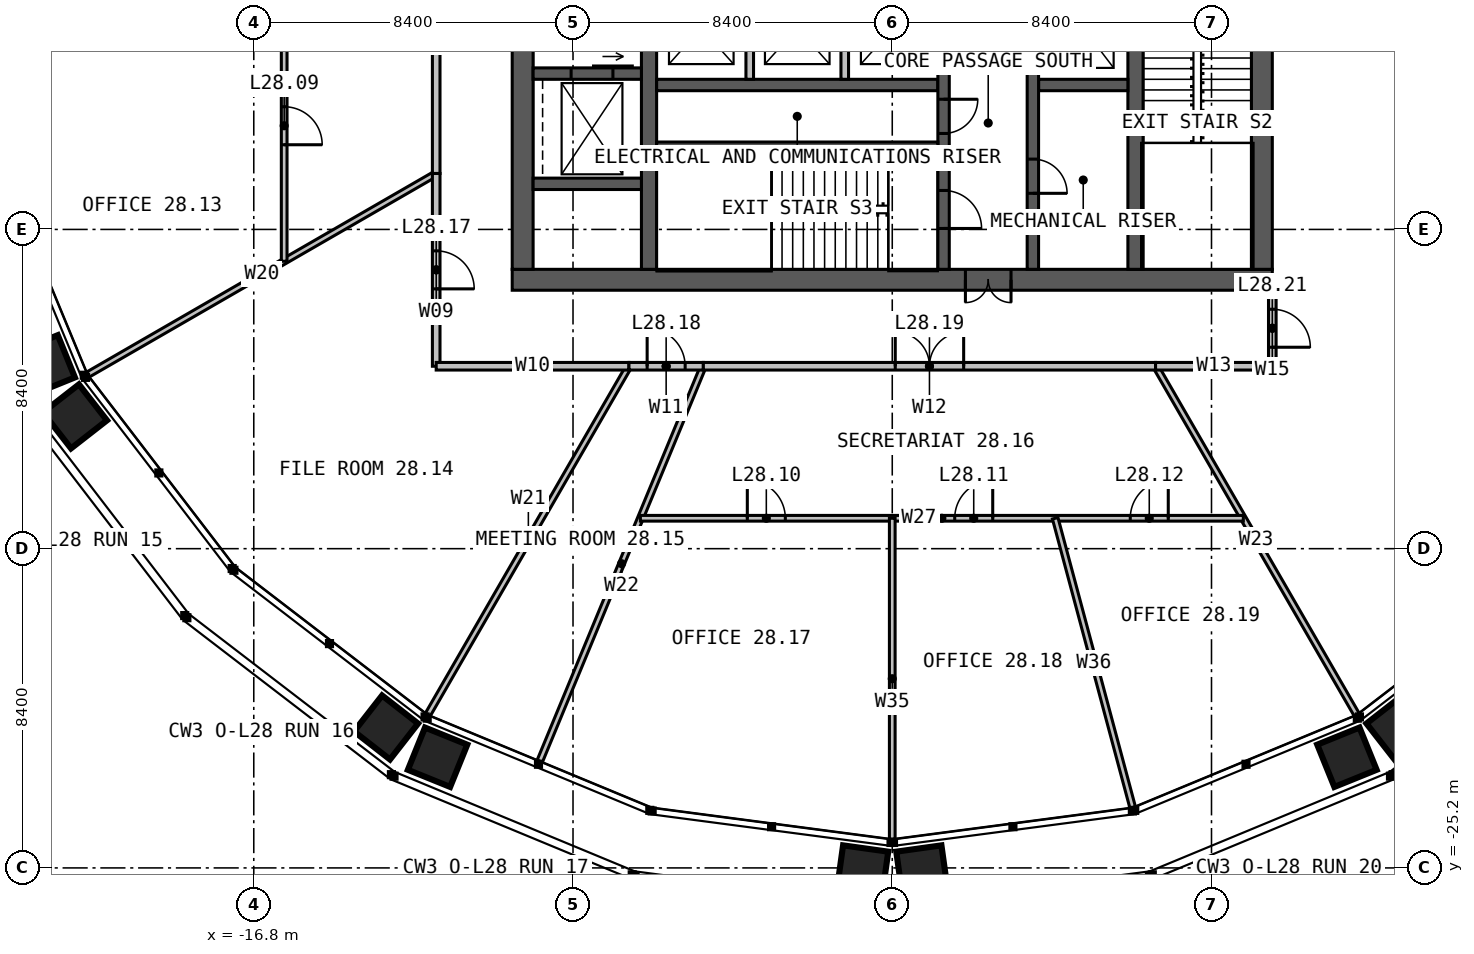
"""IFC4 building model, lengths in metres.
Left out: names, types, materials, properties, quantities, classifications, styles, units other than length and angle.
Written with IfcOpenShell. Run it as: python <this file> out.ifc"""

import sys

from ifc_helpers import new_model, si_unit, direction, frame, frame_2d, origin, place, context, subcontext, project, spatial, rectangle, extrude, element, fill, save


model = new_model("IFC4")
c1 = context("Model", 3, precision=1e-05, world=origin(), true_north=direction((0.0, 1.0)))
c2 = subcontext(c1, "Body", "Model", "MODEL_VIEW")
j1 = project(units=[si_unit("LENGTHUNIT", "METRE"), si_unit("PLANEANGLEUNIT", "RADIAN")], contexts=[c1])
p1 = place(None, origin())
s1 = spatial("IfcSite", under=j1, at=p1, CompositionType="ELEMENT")
p2 = place(p1, origin())
s2 = spatial("IfcBuilding", under=s1, at=p2, CompositionType="ELEMENT")
p3 = place(p2, frame((0.0, 0.0, 118.0)))
s3 = spatial("IfcBuildingStorey", under=s2, at=p3, CompositionType="ELEMENT", Elevation=118.0)
p4 = place(p3, frame((10.0, -9.725, 0.0), z_axis=(0.0, 0.0, 1.0), x_axis=(-1.0, 0.0, 0.0)))
e1 = element("IfcWall", 1, at=p4, inside=s3, PredefinedType="SOLIDWALL", context=c2, shape_type="SweptSolid", body=[
    extrude(rectangle(XDim=20.0, YDim=0.55, at=frame_2d((10.0, 0.0))), origin(), (0.0, 0.0, 1.0), 4.0),
])
p5 = place(p4, frame((6.875, 0.0, 0.0)))
e2 = element("IfcOpeningElement", 2, at=p5, cuts=e1, PredefinedType="OPENING", context=c2, shape_type="SweptSolid", body=[
    extrude(rectangle(XDim=1.2, YDim=2.2, at=frame_2d((0.6, 1.1))), frame((0.0, 0.285, 0.0), z_axis=(0.0, -1.0, 0.0), x_axis=(1.0, 0.0, 0.0)), (0.0, 0.0, 1.0), 0.57),
])
for number, where, z_axis, x_axis in (
    (3, (9.725, -9.45, 0.0), (0.0, 0.0, 1.0), (0.0, 1.0, 0.0)),
    (4, (-9.725, 9.45, 0.0), (0.0, 0.0, 1.0), (0.0, -1.0, 0.0)),
):
    element("IfcWall", number, at=place(p3, frame(where, z_axis=z_axis, x_axis=x_axis)), inside=s3, PredefinedType="SOLIDWALL", context=c2, shape_type="SweptSolid", body=[
        extrude(rectangle(XDim=18.9, YDim=0.55, at=frame_2d((9.45, 0.0))), origin(), (0.0, 0.0, 1.0), 4.0),
    ])
p6 = place(p3, frame((-6.4, -9.45, 0.0), z_axis=(0.0, 0.0, 1.0), x_axis=(0.0, 1.0, 0.0)))
e5 = element("IfcWall", 5, at=p6, inside=s3, PredefinedType="SOLIDWALL", context=c2, shape_type="SweptSolid", body=[
    extrude(rectangle(XDim=18.9, YDim=0.4, at=frame_2d((9.45, 0.0))), origin(), (0.0, 0.0, 1.0), 4.0),
])
p7 = place(p6, frame((8.95, 0.0, 0.0)))
e6 = element("IfcOpeningElement", 6, at=p7, cuts=e5, PredefinedType="OPENING", context=c2, shape_type="SweptSolid", body=[
    extrude(rectangle(XDim=1.0, YDim=2.2, at=frame_2d((0.5, 1.1))), frame((0.0, 0.21, 0.0), z_axis=(0.0, -1.0, 0.0), x_axis=(1.0, 0.0, 0.0)), (0.0, 0.0, 1.0), 0.42),
])
p8 = place(p3, frame((6.4, 9.45, 0.0), z_axis=(0.0, 0.0, 1.0), x_axis=(0.0, -1.0, 0.0)))
e7 = element("IfcWall", 7, at=p8, inside=s3, PredefinedType="SOLIDWALL", context=c2, shape_type="SweptSolid", body=[
    extrude(rectangle(XDim=18.9, YDim=0.4, at=frame_2d((9.45, 0.0))), origin(), (0.0, 0.0, 1.0), 4.0),
])
p9 = place(p8, frame((8.95, 0.0, 0.0)))
e8 = element("IfcOpeningElement", 8, at=p9, cuts=e7, PredefinedType="OPENING", context=c2, shape_type="SweptSolid", body=[
    extrude(rectangle(XDim=1.0, YDim=2.2, at=frame_2d((0.5, 1.1))), frame((0.0, 0.21, 0.0), z_axis=(0.0, -1.0, 0.0), x_axis=(1.0, 0.0, 0.0)), (0.0, 0.0, 1.0), 0.42),
])
p10 = place(p3, frame((-6.2, -4.6, 0.0), z_axis=(0.0, 0.0, 1.0), x_axis=(1.0, 0.0, 0.0)))
e9 = element("IfcWall", 9, at=p10, inside=s3, PredefinedType="SOLIDWALL", context=c2, shape_type="SweptSolid", body=[
    extrude(rectangle(XDim=7.4, YDim=0.3, at=frame_2d((3.7, 0.0))), origin(), (0.0, 0.0, 1.0), 4.0),
])
p11 = place(p3, frame((3.85, -4.6, 0.0), z_axis=(0.0, 0.0, 1.0), x_axis=(1.0, 0.0, 0.0)))
e10 = element("IfcWall", 10, at=p11, inside=s3, PredefinedType="SOLIDWALL", context=c2, shape_type="SweptSolid", body=[
    extrude(rectangle(XDim=2.35, YDim=0.3, at=frame_2d((1.175, 0.0))), origin(), (0.0, 0.0, 1.0), 4.0),
])
p12 = place(p3, frame((1.35, -1.45, 0.0), z_axis=(0.0, 0.0, 1.0), x_axis=(0.0, -1.0, 0.0)))
e11 = element("IfcWall", 11, at=p12, inside=s3, PredefinedType="SOLIDWALL", context=c2, shape_type="SweptSolid", body=[
    extrude(rectangle(XDim=8.0, YDim=0.3, at=frame_2d((4.0, 0.0))), origin(), (0.0, 0.0, 1.0), 4.0),
])
p13 = place(p12, frame((5.925, 0.0, 0.0)))
e12 = element("IfcOpeningElement", 12, at=p13, cuts=e11, PredefinedType="OPENING", context=c2, shape_type="SweptSolid", body=[
    extrude(rectangle(XDim=1.0, YDim=2.2, at=frame_2d((0.5, 1.1))), frame((0.0, 0.16, 0.0), z_axis=(0.0, -1.0, 0.0), x_axis=(1.0, 0.0, 0.0)), (0.0, 0.0, 1.0), 0.32),
])
p14 = place(p12, frame((3.525, 0.0, 0.0)))
e13 = element("IfcOpeningElement", 13, at=p14, cuts=e11, PredefinedType="OPENING", context=c2, shape_type="SweptSolid", body=[
    extrude(rectangle(XDim=0.9, YDim=2.2, at=frame_2d((0.45, 1.1))), frame((0.0, 0.16, 0.0), z_axis=(0.0, -1.0, 0.0), x_axis=(1.0, 0.0, 0.0)), (0.0, 0.0, 1.0), 0.32),
])
p15 = place(p3, frame((3.7, -1.45, 0.0), z_axis=(0.0, 0.0, 1.0), x_axis=(0.0, -1.0, 0.0)))
e14 = element("IfcWall", 14, at=p15, inside=s3, PredefinedType="SOLIDWALL", context=c2, shape_type="SweptSolid", body=[
    extrude(rectangle(XDim=8.0, YDim=0.3, at=frame_2d((4.0, 0.0))), origin(), (0.0, 0.0, 1.0), 4.0),
])
p16 = place(p15, frame((5.1, 0.0, 0.0)))
e15 = element("IfcOpeningElement", 15, at=p16, cuts=e14, PredefinedType="OPENING", context=c2, shape_type="SweptSolid", body=[
    extrude(rectangle(XDim=0.9, YDim=2.2, at=frame_2d((0.45, 1.1))), frame((0.0, 0.16, 0.0), z_axis=(0.0, -1.0, 0.0), x_axis=(1.0, 0.0, 0.0)), (0.0, 0.0, 1.0), 0.32),
])
p17 = place(p3, frame((-6.2, -6.2, 0.0), z_axis=(0.0, 0.0, 1.0), x_axis=(1.0, 0.0, 0.0)))
e16 = element("IfcWall", 16, at=p17, inside=s3, PredefinedType="SOLIDWALL", context=c2, shape_type="SweptSolid", body=[
    extrude(rectangle(XDim=7.4, YDim=0.2, at=frame_2d((3.7, 0.0))), origin(), (0.0, 0.0, 1.0), 4.0),
])
p18 = place(p3, frame((-9.45, -4.3, 0.0), z_axis=(0.0, 0.0, 1.0), x_axis=(1.0, 0.0, 0.0)))
e17 = element("IfcWall", 17, at=p18, inside=s3, PredefinedType="SOLIDWALL", context=c2, shape_type="SweptSolid", body=[
    extrude(rectangle(XDim=2.85, YDim=0.3, at=frame_2d((1.425, 0.0))), origin(), (0.0, 0.0, 1.0), 4.0),
])
p19 = place(p18, frame((1.0, 0.0, 0.0)))
e18 = element("IfcOpeningElement", 18, at=p19, cuts=e17, PredefinedType="OPENING", context=c2, shape_type="SweptSolid", body=[
    extrude(rectangle(XDim=1.1, YDim=2.2, at=frame_2d((0.55, 1.1))), frame((0.0, 0.16, 0.0), z_axis=(0.0, -1.0, 0.0), x_axis=(1.0, 0.0, 0.0)), (0.0, 0.0, 1.0), 0.32),
])
p20 = place(p3, frame((-9.45, -7.2, 0.0), z_axis=(0.0, 0.0, 1.0), x_axis=(1.0, 0.0, 0.0)))
e19 = element("IfcWall", 19, at=p20, inside=s3, PredefinedType="SOLIDWALL", context=c2, shape_type="SweptSolid", body=[
    extrude(rectangle(XDim=2.85, YDim=0.3, at=frame_2d((1.425, 0.0))), origin(), (0.0, 0.0, 1.0), 4.0),
])
for number, where, z_axis, x_axis in (
    (20, (-3.75, -1.75, 0.0), (0.0, 0.0, 1.0), (0.0, -1.0, 0.0)),
    (21, (-1.25, -1.75, 0.0), (0.0, 0.0, 1.0), (0.0, -1.0, 0.0)),
):
    element("IfcWall", number, at=place(p3, frame(where, z_axis=z_axis, x_axis=x_axis)), inside=s3, PredefinedType="SOLIDWALL", context=c2, shape_type="SweptSolid", body=[
        extrude(rectangle(XDim=2.7, YDim=0.2, at=frame_2d((1.35, 0.0))), origin(), (0.0, 0.0, 1.0), 3.75),
    ])
for number, where, z_axis, x_axis in (
    (22, (-12.0, -6.928, 0.0), (0.0, 0.0, 1.0), (-0.866, -0.5, 0.0)),
    (23, (-6.928, -12.0, 0.0), (0.0, 0.0, 1.0), (-0.5, -0.866, 0.0)),
):
    element("IfcWall", number, at=place(p3, frame(where, z_axis=z_axis, x_axis=x_axis)), inside=s3, PredefinedType="PARTITIONING", context=c2, shape_type="SweptSolid", body=[
        extrude(rectangle(XDim=10.587, YDim=0.15, at=frame_2d((5.293, 0.0))), origin(), (0.0, 0.0, 1.0), 2.79),
    ])
p21 = place(p3, frame((-4.97, -12.0, 0.0), z_axis=(0.0, 0.0, 1.0), x_axis=(-0.382686061022, -0.923878443682, 0.0)))
e24 = element("IfcWall", 24, at=p21, inside=s3, PredefinedType="PARTITIONING", context=c2, shape_type="SweptSolid", body=[
    extrude(rectangle(XDim=11.245, YDim=0.15, at=frame_2d((5.623, 0.0))), origin(), (0.0, 0.0, 1.0), 2.79),
])
p22 = place(p3, frame((6.928, -12.0, 0.0), z_axis=(0.0, 0.0, 1.0), x_axis=(0.500003251404, -0.866023526577, 0.0)))
e25 = element("IfcWall", 25, at=p22, inside=s3, PredefinedType="PARTITIONING", context=c2, shape_type="SweptSolid", body=[
    extrude(rectangle(XDim=10.587, YDim=0.15, at=frame_2d((5.293, 0.0))), origin(), (0.0, 0.0, 1.0), 2.79),
])
p23 = place(p3, frame((-16.0, 4.287, 0.0), z_axis=(0.0, 0.0, 1.0), x_axis=(0.0, -1.0, 0.0)))
e26 = element("IfcWall", 26, at=p23, inside=s3, PredefinedType="PARTITIONING", context=c2, shape_type="SweptSolid", body=[
    extrude(rectangle(XDim=13.525, YDim=0.15, at=frame_2d((6.762, 0.0))), origin(), (0.0, 0.0, 1.0), 2.79),
])
p24 = place(p23, frame((2.697, 0.0, 0.0)))
e27 = element("IfcOpeningElement", 27, at=p24, cuts=e26, PredefinedType="OPENING", context=c2, shape_type="SweptSolid", body=[
    extrude(rectangle(XDim=1.0, YDim=2.2, at=frame_2d((0.5, 1.1))), frame((0.0, 0.085, 0.0), z_axis=(0.0, -1.0, 0.0), x_axis=(1.0, 0.0, 0.0)), (0.0, 0.0, 1.0), 0.17),
])
p25 = place(p23, frame((9.459, 0.0, 0.0)))
e28 = element("IfcOpeningElement", 28, at=p25, cuts=e26, PredefinedType="OPENING", context=c2, shape_type="SweptSolid", body=[
    extrude(rectangle(XDim=1.0, YDim=2.2, at=frame_2d((0.5, 1.1))), frame((0.0, 0.085, 0.0), z_axis=(0.0, -1.0, 0.0), x_axis=(1.0, 0.0, 0.0)), (0.0, 0.0, 1.0), 0.17),
])
p26 = place(p3, frame((-12.0, 3.215, 0.0), z_axis=(0.0, 0.0, 1.0), x_axis=(0.0, -1.0, 0.0)))
e29 = element("IfcWall", 29, at=p26, inside=s3, PredefinedType="PARTITIONING", context=c2, shape_type="SweptSolid", body=[
    extrude(rectangle(XDim=10.144, YDim=0.2, at=frame_2d((5.072, 0.0))), origin(), (0.0, 0.0, 1.0), 3.8),
])
p27 = place(p26, frame((4.172, 0.0, 0.0)))
e30 = element("IfcOpeningElement", 30, at=p27, cuts=e29, PredefinedType="OPENING", context=c2, shape_type="SweptSolid", body=[
    extrude(rectangle(XDim=1.8, YDim=2.2, at=frame_2d((0.9, 1.1))), frame((0.0, 0.11, 0.0), z_axis=(0.0, -1.0, 0.0), x_axis=(1.0, 0.0, 0.0)), (0.0, 0.0, 1.0), 0.22),
])
p28 = place(p3, frame((-12.0, -6.928, 0.0), z_axis=(0.0, 0.0, 1.0), x_axis=(0.0, -1.0, 0.0)))
e31 = element("IfcWall", 31, at=p28, inside=s3, PredefinedType="PARTITIONING", context=c2, shape_type="SweptSolid", body=[
    extrude(rectangle(XDim=5.072, YDim=0.2, at=frame_2d((2.536, 0.0))), origin(), (0.0, 0.0, 1.0), 3.8),
])
p29 = place(p28, frame((2.036, 0.0, 0.0)))
e32 = element("IfcOpeningElement", 32, at=p29, cuts=e31, PredefinedType="OPENING", context=c2, shape_type="SweptSolid", body=[
    extrude(rectangle(XDim=1.0, YDim=2.2, at=frame_2d((0.5, 1.1))), frame((0.0, 0.11, 0.0), z_axis=(0.0, -1.0, 0.0), x_axis=(1.0, 0.0, 0.0)), (0.0, 0.0, 1.0), 0.22),
])
p30 = place(p3, frame((-12.0, -12.0, 0.0), z_axis=(0.0, 0.0, 1.0), x_axis=(1.0, 0.0, 0.0)))
e33 = element("IfcWall", 33, at=p30, inside=s3, PredefinedType="PARTITIONING", context=c2, shape_type="SweptSolid", body=[
    extrude(rectangle(XDim=5.072, YDim=0.2, at=frame_2d((2.536, 0.0))), origin(), (0.0, 0.0, 1.0), 3.8),
])
p31 = place(p3, frame((-6.928, -12.0, 0.0), z_axis=(0.0, 0.0, 1.0), x_axis=(1.0, 0.0, 0.0)))
e34 = element("IfcWall", 34, at=p31, inside=s3, PredefinedType="PARTITIONING", context=c2, shape_type="SweptSolid", body=[
    extrude(rectangle(XDim=1.958, YDim=0.2, at=frame_2d((0.979, 0.0))), origin(), (0.0, 0.0, 1.0), 3.8),
])
p32 = place(p31, frame((0.479, 0.0, 0.0)))
e35 = element("IfcOpeningElement", 35, at=p32, cuts=e34, PredefinedType="OPENING", context=c2, shape_type="SweptSolid", body=[
    extrude(rectangle(XDim=1.0, YDim=2.2, at=frame_2d((0.5, 1.1))), frame((0.0, 0.11, 0.0), z_axis=(0.0, -1.0, 0.0), x_axis=(1.0, 0.0, 0.0)), (0.0, 0.0, 1.0), 0.22),
])
p33 = place(p3, frame((-6.627, -16.0, 0.0), z_axis=(0.0, 0.0, 1.0), x_axis=(1.0, 0.0, 0.0)))
e36 = element("IfcWall", 36, at=p33, inside=s3, PredefinedType="PARTITIONING", context=c2, shape_type="SweptSolid", body=[
    extrude(rectangle(XDim=15.865, YDim=0.15, at=frame_2d((7.933, 0.0))), origin(), (0.0, 0.0, 1.0), 2.79),
])
p34 = place(p33, frame((2.814, 0.0, 0.0)))
e37 = element("IfcOpeningElement", 37, at=p34, cuts=e36, PredefinedType="OPENING", context=c2, shape_type="SweptSolid", body=[
    extrude(rectangle(XDim=1.0, YDim=2.2, at=frame_2d((0.5, 1.1))), frame((0.0, 0.085, 0.0), z_axis=(0.0, -1.0, 0.0), x_axis=(1.0, 0.0, 0.0)), (0.0, 0.0, 1.0), 0.17),
])
p35 = place(p33, frame((8.271, 0.0, 0.0)))
e38 = element("IfcOpeningElement", 38, at=p35, cuts=e36, PredefinedType="OPENING", context=c2, shape_type="SweptSolid", body=[
    extrude(rectangle(XDim=1.0, YDim=2.2, at=frame_2d((0.5, 1.1))), frame((0.0, 0.085, 0.0), z_axis=(0.0, -1.0, 0.0), x_axis=(1.0, 0.0, 0.0)), (0.0, 0.0, 1.0), 0.17),
])
p36 = place(p33, frame((12.89, 0.0, 0.0)))
e39 = element("IfcOpeningElement", 39, at=p36, cuts=e36, PredefinedType="OPENING", context=c2, shape_type="SweptSolid", body=[
    extrude(rectangle(XDim=1.0, YDim=2.2, at=frame_2d((0.5, 1.1))), frame((0.0, 0.085, 0.0), z_axis=(0.0, -1.0, 0.0), x_axis=(1.0, 0.0, 0.0)), (0.0, 0.0, 1.0), 0.17),
])
p37 = place(p3, frame((0.0, -16.0, 0.0), z_axis=(0.0, 0.0, 1.0), x_axis=(0.0, -1.0, 0.0)))
e40 = element("IfcWall", 40, at=p37, inside=s3, PredefinedType="PARTITIONING", context=c2, shape_type="SweptSolid", body=[
    extrude(rectangle(XDim=8.443, YDim=0.15, at=frame_2d((4.222, 0.0))), origin(), (0.0, 0.0, 1.0), 2.79),
])
p38 = place(p3, frame((4.287, -16.0, 0.0), z_axis=(0.0, 0.0, 1.0), x_axis=(0.258833147156, -0.965922047545, 0.0)))
e41 = element("IfcWall", 41, at=p38, inside=s3, PredefinedType="PARTITIONING", context=c2, shape_type="SweptSolid", body=[
    extrude(rectangle(XDim=7.879, YDim=0.15, at=frame_2d((3.939, 0.0))), origin(), (0.0, 0.0, 1.0), 2.79),
])
p39 = place(p3, frame((-4.97, -12.0, 0.0), z_axis=(0.0, 0.0, 1.0), x_axis=(1.0, 0.0, 0.0)))
e42 = element("IfcWall", 42, at=p39, inside=s3, PredefinedType="PARTITIONING", context=c2, shape_type="SweptSolid", body=[
    extrude(rectangle(XDim=11.899, YDim=0.2, at=frame_2d((5.949, 0.0))), origin(), (0.0, 0.0, 1.0), 3.8),
])
p40 = place(p39, frame((5.049, 0.0, 0.0)))
e43 = element("IfcOpeningElement", 43, at=p40, cuts=e42, PredefinedType="OPENING", context=c2, shape_type="SweptSolid", body=[
    extrude(rectangle(XDim=1.8, YDim=2.2, at=frame_2d((0.9, 1.1))), frame((0.0, 0.11, 0.0), z_axis=(0.0, -1.0, 0.0), x_axis=(1.0, 0.0, 0.0)), (0.0, 0.0, 1.0), 0.22),
])
p41 = place(p3, frame((6.928, -12.0, 0.0), z_axis=(0.0, 0.0, 1.0), x_axis=(1.0, 0.0, 0.0)))
e44 = element("IfcWall", 44, at=p41, inside=s3, PredefinedType="PARTITIONING", context=c2, shape_type="SweptSolid", body=[
    extrude(rectangle(XDim=3.072, YDim=0.2, at=frame_2d((1.536, 0.0))), origin(), (0.0, 0.0, 1.0), 3.8),
])
p42 = place(p3, frame((10.0, -10.0, 0.0), z_axis=(0.0, 0.0, 1.0), x_axis=(0.0, -1.0, 0.0)))
e45 = element("IfcWall", 45, at=p42, inside=s3, PredefinedType="PARTITIONING", context=c2, shape_type="SweptSolid", body=[
    extrude(rectangle(XDim=2.0, YDim=0.2, at=frame_2d((1.0, 0.0))), origin(), (0.0, 0.0, 1.0), 3.8),
])
p43 = place(p42, frame((0.5, 0.0, 0.0)))
e46 = element("IfcOpeningElement", 46, at=p43, cuts=e45, PredefinedType="OPENING", context=c2, shape_type="SweptSolid", body=[
    extrude(rectangle(XDim=1.0, YDim=2.2, at=frame_2d((0.5, 1.1))), frame((0.0, 0.11, 0.0), z_axis=(0.0, -1.0, 0.0), x_axis=(1.0, 0.0, 0.0)), (0.0, 0.0, 1.0), 0.22),
])
p44 = place(p5, origin())
e47 = element("IfcDoor", 47, at=p44, inside=s3, OperationType="DOUBLE_DOOR_SINGLE_SWING", PredefinedType="DOOR", context=c2, shape_type="SweptSolid", body=[
    extrude(rectangle(XDim=1.2, YDim=2.2, at=frame_2d((0.6, 1.1))), frame((0.0, 0.025, 0.0), z_axis=(0.0, -1.0, 0.0), x_axis=(1.0, 0.0, 0.0)), (0.0, 0.0, 1.0), 0.05),
])
fill(e2, e47)
p45 = place(p13, origin())
e48 = element("IfcDoor", 48, at=p45, inside=s3, OperationType="SINGLE_SWING_RIGHT", PredefinedType="DOOR", context=c2, shape_type="SweptSolid", body=[
    extrude(rectangle(XDim=1.0, YDim=2.2, at=frame_2d((0.5, 1.1))), frame((0.0, 0.025, 0.0), z_axis=(0.0, -1.0, 0.0), x_axis=(1.0, 0.0, 0.0)), (0.0, 0.0, 1.0), 0.05),
])
fill(e12, e48)
p46 = place(p14, origin())
e49 = element("IfcDoor", 49, at=p46, inside=s3, OperationType="SINGLE_SWING_LEFT", PredefinedType="DOOR", context=c2, shape_type="SweptSolid", body=[
    extrude(rectangle(XDim=0.9, YDim=2.2, at=frame_2d((0.45, 1.1))), frame((0.0, 0.025, 0.0), z_axis=(0.0, -1.0, 0.0), x_axis=(1.0, 0.0, 0.0)), (0.0, 0.0, 1.0), 0.05),
])
fill(e13, e49)
p47 = place(p16, origin())
e50 = element("IfcDoor", 50, at=p47, inside=s3, OperationType="SINGLE_SWING_RIGHT", PredefinedType="DOOR", context=c2, shape_type="SweptSolid", body=[
    extrude(rectangle(XDim=0.9, YDim=2.2, at=frame_2d((0.45, 1.1))), frame((0.0, 0.025, 0.0), z_axis=(0.0, -1.0, 0.0), x_axis=(1.0, 0.0, 0.0)), (0.0, 0.0, 1.0), 0.05),
])
fill(e15, e50)
p48 = place(p19, origin())
e51 = element("IfcDoor", 51, at=p48, inside=s3, OperationType="SLIDING_TO_LEFT", PredefinedType="DOOR", context=c2, shape_type="SweptSolid", body=[
    extrude(rectangle(XDim=1.1, YDim=2.2, at=frame_2d((0.55, 1.1))), frame((0.0, 0.025, 0.0), z_axis=(0.0, -1.0, 0.0), x_axis=(1.0, 0.0, 0.0)), (0.0, 0.0, 1.0), 0.05),
])
fill(e18, e51)
p49 = place(p25, origin())
e52 = element("IfcDoor", 52, at=p49, inside=s3, OperationType="SINGLE_SWING_RIGHT", PredefinedType="DOOR", context=c2, shape_type="SweptSolid", body=[
    extrude(rectangle(XDim=1.0, YDim=2.2, at=frame_2d((0.5, 1.1))), frame((0.0, 0.025, 0.0), z_axis=(0.0, -1.0, 0.0), x_axis=(1.0, 0.0, 0.0)), (0.0, 0.0, 1.0), 0.05),
])
fill(e28, e52)
p50 = place(p29, origin())
e53 = element("IfcDoor", 53, at=p50, inside=s3, OperationType="SINGLE_SWING_RIGHT", PredefinedType="DOOR", context=c2, shape_type="SweptSolid", body=[
    extrude(rectangle(XDim=1.0, YDim=2.2, at=frame_2d((0.5, 1.1))), frame((0.0, 0.025, 0.0), z_axis=(0.0, -1.0, 0.0), x_axis=(1.0, 0.0, 0.0)), (0.0, 0.0, 1.0), 0.05),
])
fill(e32, e53)
p51 = place(p32, origin())
e54 = element("IfcDoor", 54, at=p51, inside=s3, OperationType="SINGLE_SWING_LEFT", PredefinedType="DOOR", context=c2, shape_type="SweptSolid", body=[
    extrude(rectangle(XDim=1.0, YDim=2.2, at=frame_2d((0.5, 1.1))), frame((0.0, 0.025, 0.0), z_axis=(0.0, -1.0, 0.0), x_axis=(1.0, 0.0, 0.0)), (0.0, 0.0, 1.0), 0.05),
])
fill(e35, e54)
p52 = place(p34, origin())
e55 = element("IfcDoor", 55, at=p52, inside=s3, OperationType="SINGLE_SWING_LEFT", PredefinedType="DOOR", context=c2, shape_type="SweptSolid", body=[
    extrude(rectangle(XDim=1.0, YDim=2.2, at=frame_2d((0.5, 1.1))), frame((0.0, 0.025, 0.0), z_axis=(0.0, -1.0, 0.0), x_axis=(1.0, 0.0, 0.0)), (0.0, 0.0, 1.0), 0.05),
])
fill(e37, e55)
p53 = place(p35, origin())
e56 = element("IfcDoor", 56, at=p53, inside=s3, OperationType="SINGLE_SWING_RIGHT", PredefinedType="DOOR", context=c2, shape_type="SweptSolid", body=[
    extrude(rectangle(XDim=1.0, YDim=2.2, at=frame_2d((0.5, 1.1))), frame((0.0, 0.025, 0.0), z_axis=(0.0, -1.0, 0.0), x_axis=(1.0, 0.0, 0.0)), (0.0, 0.0, 1.0), 0.05),
])
fill(e38, e56)
p54 = place(p36, origin())
e57 = element("IfcDoor", 57, at=p54, inside=s3, OperationType="SINGLE_SWING_RIGHT", PredefinedType="DOOR", context=c2, shape_type="SweptSolid", body=[
    extrude(rectangle(XDim=1.0, YDim=2.2, at=frame_2d((0.5, 1.1))), frame((0.0, 0.025, 0.0), z_axis=(0.0, -1.0, 0.0), x_axis=(1.0, 0.0, 0.0)), (0.0, 0.0, 1.0), 0.05),
])
fill(e39, e57)
p55 = place(p40, origin())
e58 = element("IfcDoor", 58, at=p55, inside=s3, OperationType="DOUBLE_DOOR_SINGLE_SWING", PredefinedType="DOOR", context=c2, shape_type="SweptSolid", body=[
    extrude(rectangle(XDim=1.8, YDim=2.2, at=frame_2d((0.9, 1.1))), frame((0.0, 0.025, 0.0), z_axis=(0.0, -1.0, 0.0), x_axis=(1.0, 0.0, 0.0)), (0.0, 0.0, 1.0), 0.05),
])
fill(e43, e58)
p56 = place(p43, origin())
e59 = element("IfcDoor", 59, at=p56, inside=s3, OperationType="SINGLE_SWING_RIGHT", PredefinedType="DOOR", context=c2, shape_type="SweptSolid", body=[
    extrude(rectangle(XDim=1.0, YDim=2.2, at=frame_2d((0.5, 1.1))), frame((0.0, 0.025, 0.0), z_axis=(0.0, -1.0, 0.0), x_axis=(1.0, 0.0, 0.0)), (0.0, 0.0, 1.0), 0.05),
])
fill(e46, e59)
save(model, sys.argv[1])
